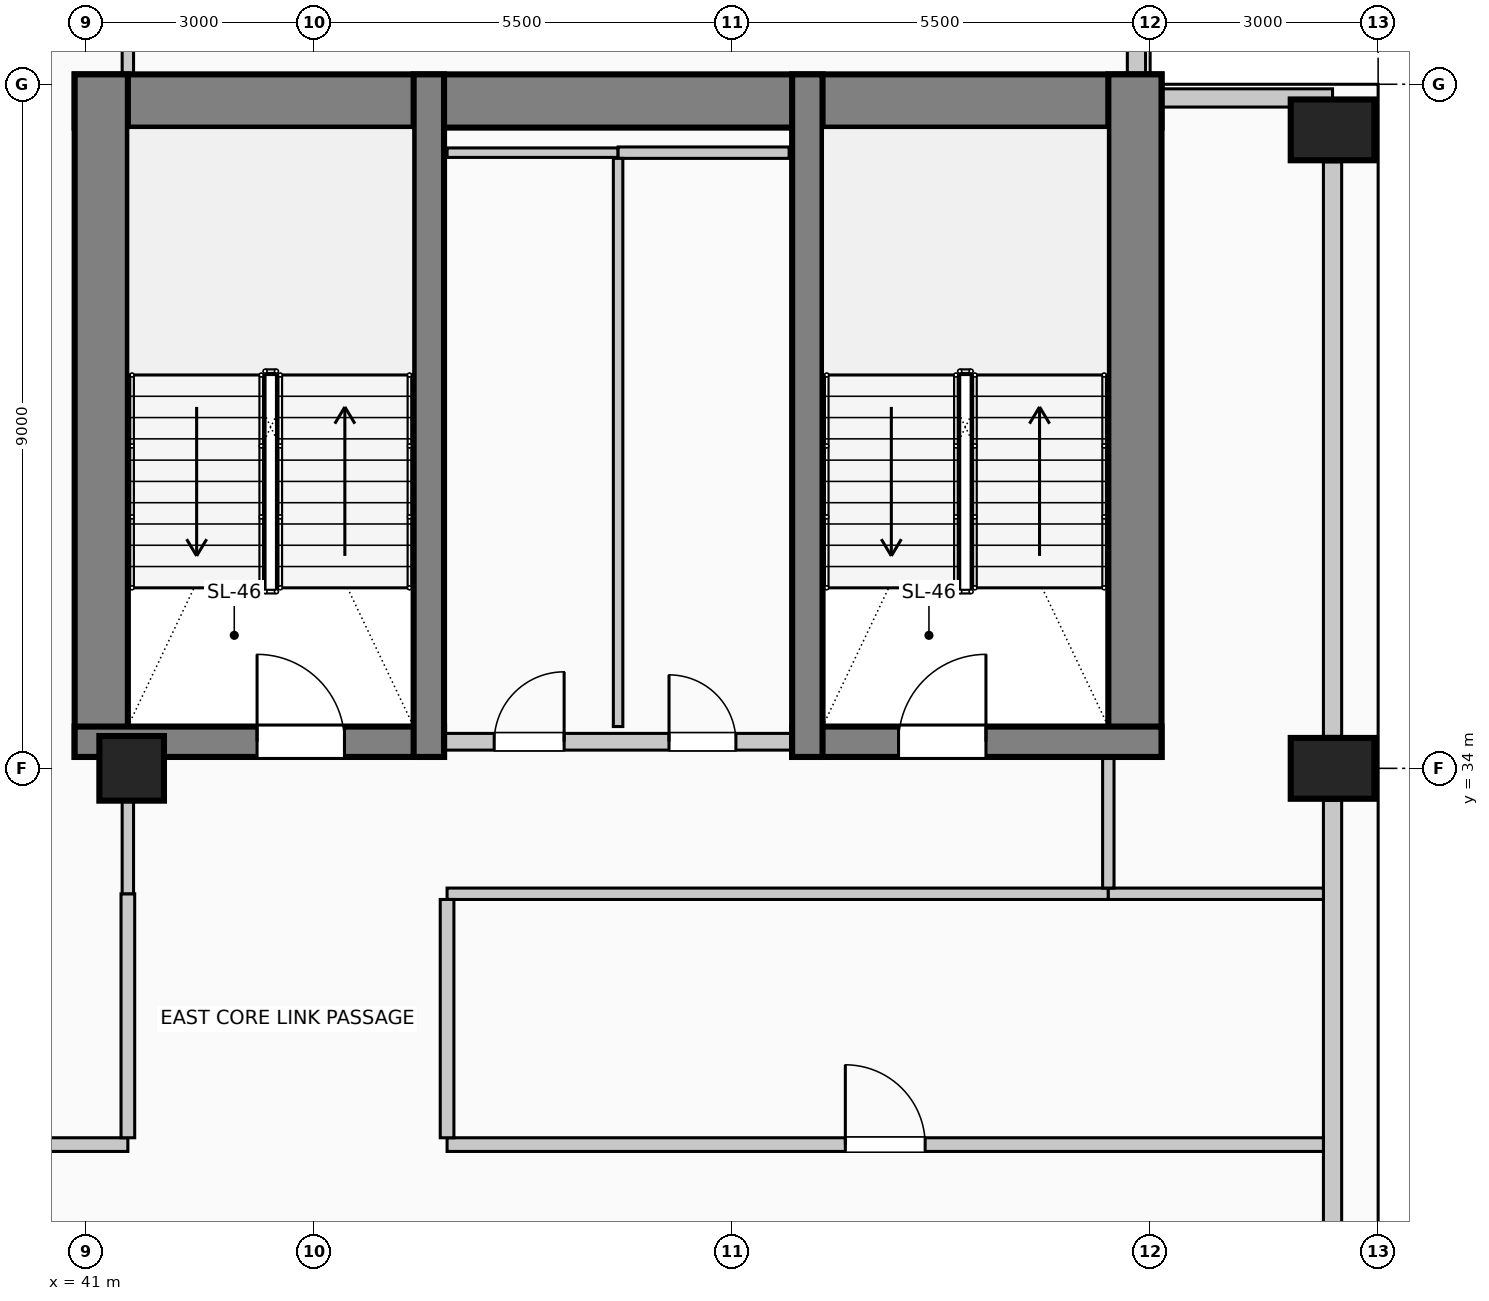
"""IFC4 building model, lengths in metres.
Left out: names, types, materials, properties, quantities, classifications, styles, units other than length and angle.
Written with IfcOpenShell. Run it as: python <this file> out.ifc"""

import sys

from ifc_helpers import new_model, si_unit, direction, frame, frame_2d, origin, origin_2d, place, context, subcontext, project, spatial, rectangle, circle, extrude, element, fill, save


model = new_model("IFC4")
c1 = context("Model", 3, precision=1e-05, world=origin(), true_north=direction((0.0, 1.0)))
c2 = subcontext(c1, "Body", "Model", "MODEL_VIEW")
j1 = project(units=[si_unit("LENGTHUNIT", "METRE"), si_unit("PLANEANGLEUNIT", "RADIAN")], contexts=[c1])
p1 = place(None, origin())
s1 = spatial("IfcSite", under=j1, at=p1, CompositionType="ELEMENT")
p2 = place(p1, origin())
s2 = spatial("IfcBuilding", under=s1, at=p2, CompositionType="ELEMENT")
p3 = place(p2, frame((0.0, 0.0, 202.6)))
s3 = spatial("IfcBuildingStorey", under=s2, at=p3, CompositionType="ELEMENT", Elevation=202.6)
p4 = place(p3, frame((40.85, 42.78, 0.0), z_axis=(0.0, 0.0, 1.0), x_axis=(1.0, 0.0, 0.0)))
e1 = element("IfcWall", 1, at=p4, inside=s3, PredefinedType="SHEAR", context=c2, shape_type="SweptSolid", body=[
    extrude(rectangle(XDim=14.3, YDim=0.7, at=frame_2d((7.15, 0.0))), origin(), (0.0, 0.0, 1.0), 4.0),
])
for number, where, z_axis, x_axis in (
    (2, (41.2, 34.15, 0.0), (0.0, 0.0, 1.0), (0.0, 1.0, 0.0)),
    (3, (54.8, 34.15, 0.0), (0.0, 0.0, 1.0), (0.0, 1.0, 0.0)),
):
    element("IfcWall", number, at=place(p3, frame(where, z_axis=z_axis, x_axis=x_axis)), inside=s3, PredefinedType="SHEAR", context=c2, shape_type="SweptSolid", body=[
        extrude(rectangle(XDim=8.98, YDim=0.7, at=frame_2d((4.49, 0.0))), origin(), (0.0, 0.0, 1.0), 4.0),
    ])
p5 = place(p3, frame((40.85, 34.35, 0.0), z_axis=(0.0, 0.0, 1.0), x_axis=(1.0, 0.0, 0.0)))
e4 = element("IfcWall", 4, at=p5, inside=s3, PredefinedType="SHEAR", context=c2, shape_type="SweptSolid", body=[
    extrude(rectangle(XDim=4.86, YDim=0.4, at=frame_2d((2.43, 0.0))), origin(), (0.0, 0.0, 1.0), 4.0),
])
p6 = place(p5, frame((2.4, 0.0, 0.0)))
e5 = element("IfcOpeningElement", 5, at=p6, cuts=e4, PredefinedType="OPENING", context=c2, shape_type="SweptSolid", body=[
    extrude(rectangle(XDim=1.15, YDim=2.2, at=frame_2d((0.575, 1.1))), frame((0.0, 0.21, 0.0), z_axis=(0.0, -1.0, 0.0), x_axis=(1.0, 0.0, 0.0)), (0.0, 0.0, 1.0), 0.42),
])
p7 = place(p3, frame((45.51, 34.15, 0.0), z_axis=(0.0, 0.0, 1.0), x_axis=(0.0, 1.0, 0.0)))
e6 = element("IfcWall", 6, at=p7, inside=s3, PredefinedType="SHEAR", context=c2, shape_type="SweptSolid", body=[
    extrude(rectangle(XDim=8.98, YDim=0.4, at=frame_2d((4.49, 0.0))), origin(), (0.0, 0.0, 1.0), 4.0),
])
p8 = place(p3, frame((50.29, 34.35, 0.0), z_axis=(0.0, 0.0, 1.0), x_axis=(1.0, 0.0, 0.0)))
e7 = element("IfcWall", 7, at=p8, inside=s3, PredefinedType="SHEAR", context=c2, shape_type="SweptSolid", body=[
    extrude(rectangle(XDim=4.86, YDim=0.4, at=frame_2d((2.43, 0.0))), origin(), (0.0, 0.0, 1.0), 4.0),
])
p9 = place(p8, frame((1.4, 0.0, 0.0)))
e8 = element("IfcOpeningElement", 8, at=p9, cuts=e7, PredefinedType="OPENING", context=c2, shape_type="SweptSolid", body=[
    extrude(rectangle(XDim=1.15, YDim=2.2, at=frame_2d((0.575, 1.1))), frame((0.0, 0.21, 0.0), z_axis=(0.0, -1.0, 0.0), x_axis=(1.0, 0.0, 0.0)), (0.0, 0.0, 1.0), 0.42),
])
p10 = place(p3, frame((50.49, 34.15, 0.0), z_axis=(0.0, 0.0, 1.0), x_axis=(0.0, 1.0, 0.0)))
e9 = element("IfcWall", 9, at=p10, inside=s3, PredefinedType="SHEAR", context=c2, shape_type="SweptSolid", body=[
    extrude(rectangle(XDim=8.98, YDim=0.4, at=frame_2d((4.49, 0.0))), origin(), (0.0, 0.0, 1.0), 4.0),
])
for number, where, z_axis, x_axis in (
    (10, (57.4, 34.0, 0.0), (0.0, 0.0, 1.0), (0.0, 1.0, 0.0)),
    (11, (57.4, 42.4, 0.0), (0.0, 0.0, 1.0), (0.0, 1.0, 0.0)),
):
    element("IfcColumn", number, at=place(p3, frame(where, z_axis=z_axis, x_axis=x_axis)), inside=s3, PredefinedType="COLUMN", context=c2, shape_type="SweptSolid", body=[
        extrude(rectangle(XDim=0.8, YDim=1.1, at=origin_2d()), origin(), (0.0, 0.0, 1.0), 4.0),
    ])
p11 = place(p3, frame((41.6, 34.0, 0.0), z_axis=(0.0, 0.0, 1.0), x_axis=(1.0, 0.0, 0.0)))
e12 = element("IfcColumn", 12, at=p11, inside=s3, PredefinedType="COLUMN", context=c2, shape_type="SweptSolid", body=[
    extrude(circle(Radius=0.425, at=origin_2d()), origin(), (0.0, 0.0, 1.0), 4.0),
])
p12 = place(p3, frame((57.4, 33.58, 0.0), z_axis=(0.0, 0.0, 1.0), x_axis=(0.0, -1.0, 0.0)))
e13 = element("IfcWall", 13, at=p12, inside=s3, PredefinedType="SOLIDWALL", context=c2, shape_type="SweptSolid", body=[
    extrude(rectangle(XDim=7.16, YDim=0.24, at=frame_2d((3.58, 0.0))), origin(), (0.0, 0.0, 1.0), 3.0),
])
p13 = place(p3, frame((57.4, 41.98, 0.0), z_axis=(0.0, 0.0, 1.0), x_axis=(0.0, -1.0, 0.0)))
e14 = element("IfcWall", 14, at=p13, inside=s3, PredefinedType="SOLIDWALL", context=c2, shape_type="SweptSolid", body=[
    extrude(rectangle(XDim=7.56, YDim=0.24, at=frame_2d((3.78, 0.0))), origin(), (0.0, 0.0, 1.0), 3.0),
])
p14 = place(p3, frame((54.82, 45.4, 0.0), z_axis=(0.0, 0.0, 1.0), x_axis=(0.0, -1.0, 0.0)))
e15 = element("IfcWall", 15, at=p14, inside=s3, PredefinedType="SOLIDWALL", context=c2, shape_type="SweptSolid", body=[
    extrude(rectangle(XDim=2.265, YDim=0.24, at=frame_2d((1.132, 0.0))), origin(), (0.0, 0.0, 1.0), 3.75),
])
p15 = place(p3, frame((55.155, 42.82, 0.0), z_axis=(0.0, 0.0, 1.0), x_axis=(1.0, 0.0, 0.0)))
e16 = element("IfcWall", 16, at=p15, inside=s3, PredefinedType="SOLIDWALL", context=c2, shape_type="SweptSolid", body=[
    extrude(rectangle(XDim=2.245, YDim=0.24, at=frame_2d((1.123, 0.0))), origin(), (0.0, 0.0, 1.0), 3.75),
])
p16 = place(p3, frame((45.72, 34.35, 0.0), z_axis=(0.0, 0.0, 1.0), x_axis=(1.0, 0.0, 0.0)))
e17 = element("IfcWall", 17, at=p16, inside=s3, PredefinedType="PARTITIONING", context=c2, shape_type="SweptSolid", body=[
    extrude(rectangle(XDim=4.56, YDim=0.22, at=frame_2d((2.28, 0.0))), origin(), (0.0, 0.0, 1.0), 3.75),
])
p17 = place(p16, frame((0.65, 0.0, 0.0)))
e18 = element("IfcOpeningElement", 18, at=p17, cuts=e17, PredefinedType="OPENING", context=c2, shape_type="SweptSolid", body=[
    extrude(rectangle(XDim=0.92, YDim=2.1, at=frame_2d((0.46, 1.05))), frame((0.0, 0.12, 0.0), z_axis=(0.0, -1.0, 0.0), x_axis=(1.0, 0.0, 0.0)), (0.0, 0.0, 1.0), 0.24),
])
p18 = place(p16, frame((2.95, 0.0, 0.0)))
e19 = element("IfcOpeningElement", 19, at=p18, cuts=e17, PredefinedType="OPENING", context=c2, shape_type="SweptSolid", body=[
    extrude(rectangle(XDim=0.88, YDim=2.1, at=frame_2d((0.44, 1.05))), frame((0.0, 0.12, 0.0), z_axis=(0.0, -1.0, 0.0), x_axis=(1.0, 0.0, 0.0)), (0.0, 0.0, 1.0), 0.24),
])
p19 = place(p3, frame((34.22, 29.05, 0.0), z_axis=(0.0, 0.0, 1.0), x_axis=(1.0, 0.0, 0.0)))
e20 = element("IfcWall", 20, at=p19, inside=s3, PredefinedType="PARTITIONING", context=c2, shape_type="SweptSolid", body=[
    extrude(rectangle(XDim=7.33, YDim=0.18, at=frame_2d((3.665, 0.0))), origin(), (0.0, 0.0, 1.0), 3.75),
])
p20 = place(p19, frame((3.19, 0.0, 0.0)))
e21 = element("IfcOpeningElement", 21, at=p20, cuts=e20, PredefinedType="OPENING", context=c2, shape_type="SweptSolid", body=[
    extrude(rectangle(XDim=0.95, YDim=2.15, at=frame_2d((0.475, 1.075))), frame((0.0, 0.1, 0.0), z_axis=(0.0, -1.0, 0.0), x_axis=(1.0, 0.0, 0.0)), (0.0, 0.0, 1.0), 0.2),
])
p21 = place(p3, frame((45.75, 29.05, 0.0), z_axis=(0.0, 0.0, 1.0), x_axis=(1.0, 0.0, 0.0)))
e22 = element("IfcWall", 22, at=p21, inside=s3, PredefinedType="PARTITIONING", context=c2, shape_type="SweptSolid", body=[
    extrude(rectangle(XDim=11.53, YDim=0.18, at=frame_2d((5.765, 0.0))), origin(), (0.0, 0.0, 1.0), 3.75),
])
p22 = place(p21, frame((5.24, 0.0, 0.0)))
e23 = element("IfcOpeningElement", 23, at=p22, cuts=e22, PredefinedType="OPENING", context=c2, shape_type="SweptSolid", body=[
    extrude(rectangle(XDim=1.05, YDim=2.15, at=frame_2d((0.525, 1.075))), frame((0.0, 0.1, 0.0), z_axis=(0.0, -1.0, 0.0), x_axis=(1.0, 0.0, 0.0)), (0.0, 0.0, 1.0), 0.2),
])
p23 = place(p3, frame((45.75, 32.35, 0.0), z_axis=(0.0, 0.0, 1.0), x_axis=(1.0, 0.0, 0.0)))
e24 = element("IfcWall", 24, at=p23, inside=s3, PredefinedType="PARTITIONING", context=c2, shape_type="SweptSolid", body=[
    extrude(rectangle(XDim=8.7, YDim=0.15, at=frame_2d((4.35, 0.0))), origin(), (0.0, 0.0, 1.0), 3.75),
])
p24 = place(p3, frame((54.45, 32.35, 0.0), z_axis=(0.0, 0.0, 1.0), x_axis=(1.0, 0.0, 0.0)))
e25 = element("IfcWall", 25, at=p24, inside=s3, PredefinedType="PARTITIONING", context=c2, shape_type="SweptSolid", body=[
    extrude(rectangle(XDim=2.83, YDim=0.15, at=frame_2d((1.415, 0.0))), origin(), (0.0, 0.0, 1.0), 3.75),
])
p25 = place(p3, frame((45.75, 42.1, 0.0), z_axis=(0.0, 0.0, 1.0), x_axis=(1.0, 0.0, 0.0)))
e26 = element("IfcWall", 26, at=p25, inside=s3, PredefinedType="PARTITIONING", context=c2, shape_type="SweptSolid", body=[
    extrude(rectangle(XDim=2.25, YDim=0.125, at=frame_2d((1.125, 0.0))), origin(), (0.0, 0.0, 1.0), 3.75),
])
p26 = place(p3, frame((48.0, 42.1, 0.0), z_axis=(0.0, 0.0, 1.0), x_axis=(1.0, 0.0, 0.0)))
e27 = element("IfcWall", 27, at=p26, inside=s3, PredefinedType="PARTITIONING", context=c2, shape_type="SweptSolid", body=[
    extrude(rectangle(XDim=2.25, YDim=0.15, at=frame_2d((1.125, 0.0))), origin(), (0.0, 0.0, 1.0), 3.75),
])
p27 = place(p3, frame((41.55, 29.14, 0.0), z_axis=(0.0, 0.0, 1.0), x_axis=(0.0, 1.0, 0.0)))
e28 = element("IfcWall", 28, at=p27, inside=s3, PredefinedType="PARTITIONING", context=c2, shape_type="SweptSolid", body=[
    extrude(rectangle(XDim=3.21, YDim=0.18, at=frame_2d((1.605, 0.0))), origin(), (0.0, 0.0, 1.0), 3.145),
])
p28 = place(p3, frame((41.55, 32.35, 0.0), z_axis=(0.0, 0.0, 1.0), x_axis=(0.0, 1.0, 0.0)))
e29 = element("IfcWall", 29, at=p28, inside=s3, PredefinedType="PARTITIONING", context=c2, shape_type="SweptSolid", body=[
    extrude(rectangle(XDim=1.225, YDim=0.15, at=frame_2d((0.612, 0.0))), origin(), (0.0, 0.0, 1.0), 3.145),
])
p29 = place(p3, frame((41.55, 43.13, 0.0), z_axis=(0.0, 0.0, 1.0), x_axis=(0.0, 1.0, 0.0)))
e30 = element("IfcWall", 30, at=p29, inside=s3, PredefinedType="PARTITIONING", context=c2, shape_type="SweptSolid", body=[
    extrude(rectangle(XDim=1.62, YDim=0.15, at=frame_2d((0.81, 0.0))), origin(), (0.0, 0.0, 1.0), 3.75),
])
p30 = place(p3, frame((45.75, 29.14, 0.0), z_axis=(0.0, 0.0, 1.0), x_axis=(0.0, 1.0, 0.0)))
e31 = element("IfcWall", 31, at=p30, inside=s3, PredefinedType="PARTITIONING", context=c2, shape_type="SweptSolid", body=[
    extrude(rectangle(XDim=3.135, YDim=0.18, at=frame_2d((1.567, 0.0))), origin(), (0.0, 0.0, 1.0), 3.75),
])
p31 = place(p3, frame((48.0, 34.55, 0.0), z_axis=(0.0, 0.0, 1.0), x_axis=(0.0, 1.0, 0.0)))
e32 = element("IfcWall", 32, at=p31, inside=s3, PredefinedType="PARTITIONING", context=c2, shape_type="SweptSolid", body=[
    extrude(rectangle(XDim=7.475, YDim=0.125, at=frame_2d((3.737, 0.0))), origin(), (0.0, 0.0, 1.0), 3.75),
])
p32 = place(p3, frame((54.45, 32.425, 0.0), z_axis=(0.0, 0.0, 1.0), x_axis=(0.0, 1.0, 0.0)))
e33 = element("IfcWall", 33, at=p32, inside=s3, PredefinedType="PARTITIONING", context=c2, shape_type="SweptSolid", body=[
    extrude(rectangle(XDim=1.725, YDim=0.15, at=frame_2d((0.862, 0.0))), origin(), (0.0, 0.0, 1.0), 3.75),
])
p33 = place(p6, origin())
e34 = element("IfcDoor", 34, at=p33, inside=s3, OperationType="SINGLE_SWING_LEFT", PredefinedType="DOOR", context=c2, shape_type="SweptSolid", body=[
    extrude(rectangle(XDim=1.15, YDim=2.2, at=frame_2d((0.575, 1.1))), frame((0.0, 0.025, 0.0), z_axis=(0.0, -1.0, 0.0), x_axis=(1.0, 0.0, 0.0)), (0.0, 0.0, 1.0), 0.05),
])
fill(e5, e34)
p34 = place(p17, origin())
e35 = element("IfcDoor", 35, at=p34, inside=s3, OperationType="SINGLE_SWING_RIGHT", PredefinedType="DOOR", context=c2, shape_type="SweptSolid", body=[
    extrude(rectangle(XDim=0.92, YDim=2.1, at=frame_2d((0.46, 1.05))), frame((0.0, 0.025, 0.0), z_axis=(0.0, -1.0, 0.0), x_axis=(1.0, 0.0, 0.0)), (0.0, 0.0, 1.0), 0.05),
])
fill(e18, e35)
p35 = place(p18, origin())
e36 = element("IfcDoor", 36, at=p35, inside=s3, OperationType="SINGLE_SWING_LEFT", PredefinedType="DOOR", context=c2, shape_type="SweptSolid", body=[
    extrude(rectangle(XDim=0.88, YDim=2.1, at=frame_2d((0.44, 1.05))), frame((0.0, 0.025, 0.0), z_axis=(0.0, -1.0, 0.0), x_axis=(1.0, 0.0, 0.0)), (0.0, 0.0, 1.0), 0.05),
])
fill(e19, e36)
p36 = place(p9, origin())
e37 = element("IfcDoor", 37, at=p36, inside=s3, OperationType="SINGLE_SWING_RIGHT", PredefinedType="DOOR", context=c2, shape_type="SweptSolid", body=[
    extrude(rectangle(XDim=1.15, YDim=2.2, at=frame_2d((0.575, 1.1))), frame((0.0, 0.025, 0.0), z_axis=(0.0, -1.0, 0.0), x_axis=(1.0, 0.0, 0.0)), (0.0, 0.0, 1.0), 0.05),
])
fill(e8, e37)
p37 = place(p22, origin())
e38 = element("IfcDoor", 38, at=p37, inside=s3, OperationType="SINGLE_SWING_LEFT", PredefinedType="DOOR", context=c2, shape_type="SweptSolid", body=[
    extrude(rectangle(XDim=1.05, YDim=2.15, at=frame_2d((0.525, 1.075))), frame((0.0, 0.025, 0.0), z_axis=(0.0, -1.0, 0.0), x_axis=(1.0, 0.0, 0.0)), (0.0, 0.0, 1.0), 0.05),
])
fill(e23, e38)
save(model, sys.argv[1])
